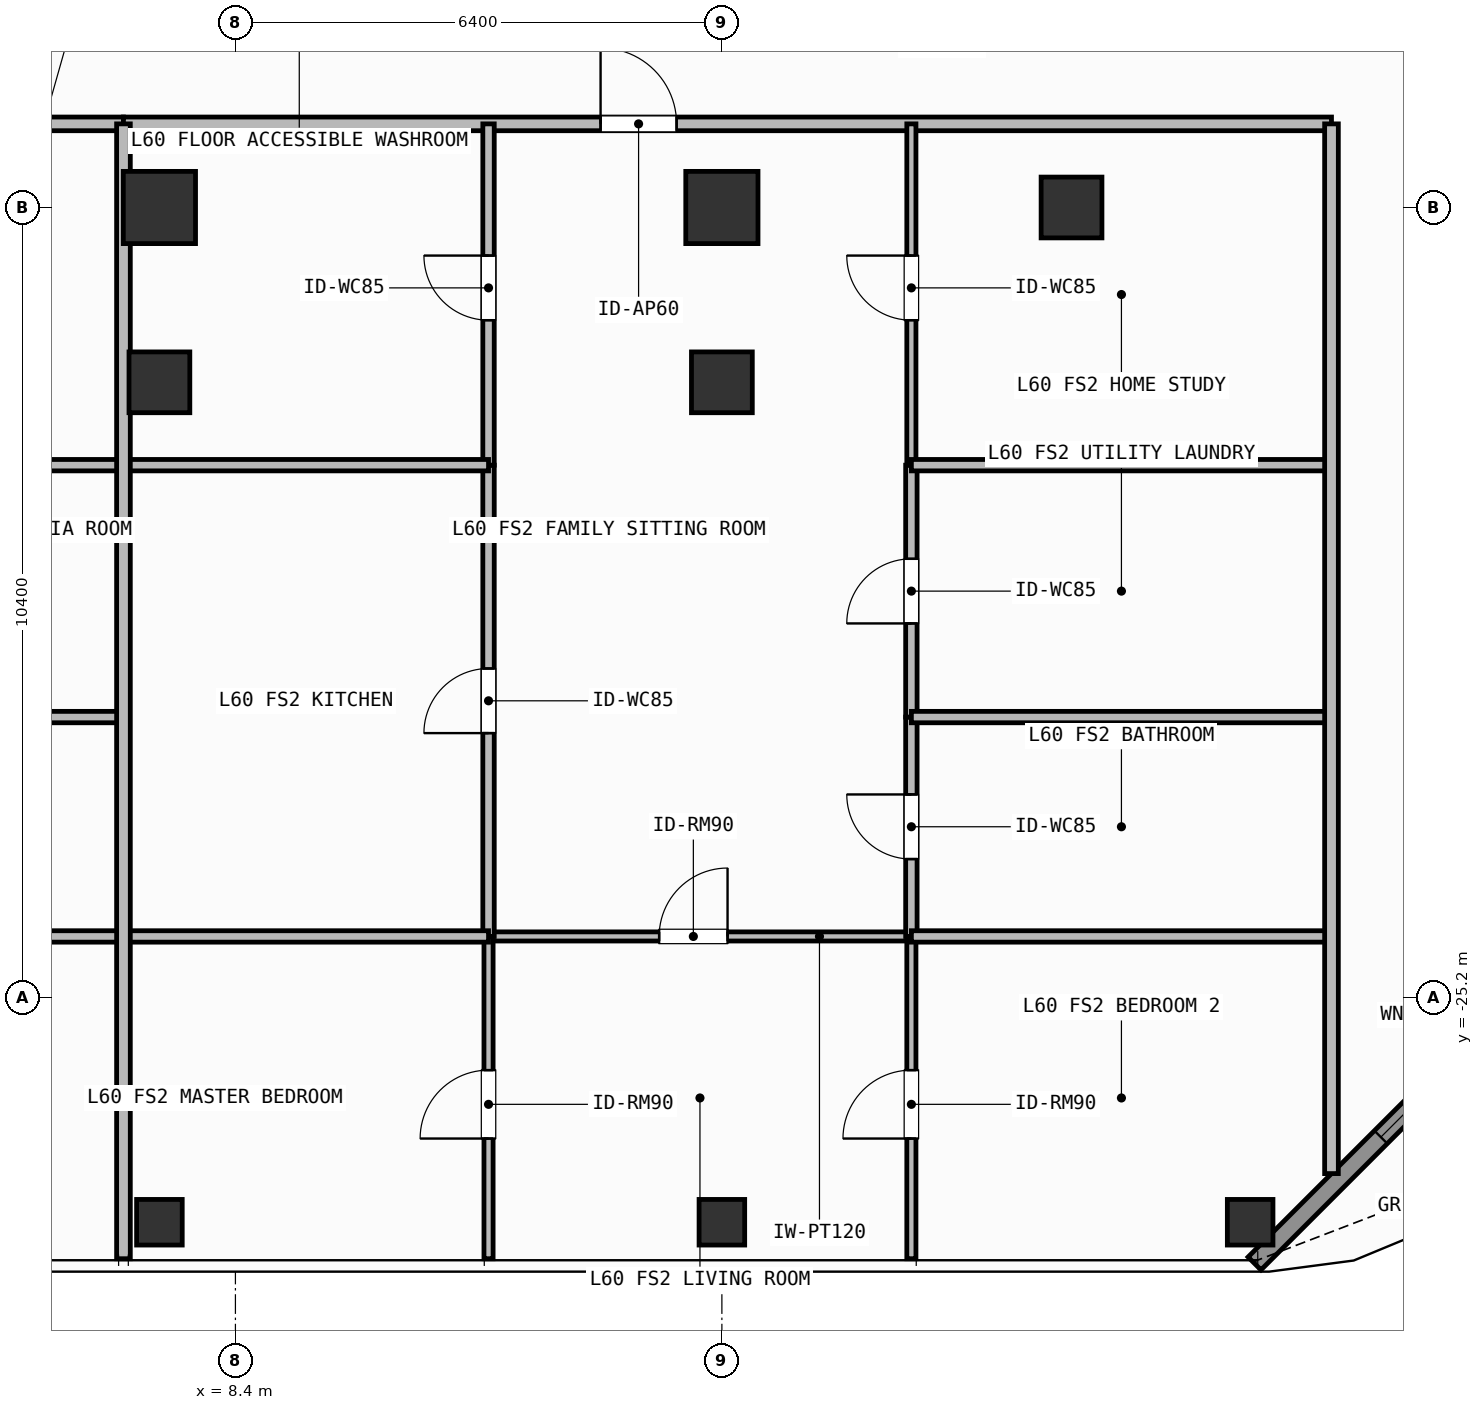
"""IFC4 building model, lengths in metres.
Left out: names, types, materials, properties, quantities, classifications, styles, units other than length and angle.
Written with IfcOpenShell. Run it as: python <this file> out.ifc"""

import sys

from ifc_helpers import new_model, si_unit, direction, frame, frame_2d, origin, origin_2d, place, context, subcontext, project, spatial, rectangle, hollow_rectangle, extrude, element, fill, save


model = new_model("IFC4")
c1 = context("Model", 3, precision=1e-05, world=origin(), true_north=direction((0.0, 1.0)))
c2 = subcontext(c1, "Body", "Model", "MODEL_VIEW")
j1 = project(units=[si_unit("LENGTHUNIT", "METRE"), si_unit("PLANEANGLEUNIT", "RADIAN")], contexts=[c1])
p1 = place(None, origin())
s1 = spatial("IfcSite", under=j1, at=p1, CompositionType="ELEMENT")
p2 = place(p1, origin())
s2 = spatial("IfcBuilding", under=s1, at=p2, CompositionType="ELEMENT")
p3 = place(p2, frame((0.0, 0.0, 246.9)))
s3 = spatial("IfcBuildingStorey", under=s2, at=p3, CompositionType="ELEMENT", Elevation=246.9)
for number, where, z_axis, x_axis in (
    (1, (7.4, -14.8, 0.0), (0.0, 0.0, 1.0), (1.0, 0.0, 0.0)),
    (2, (14.8, -14.8, 0.0), (0.0, 0.0, 1.0), (1.0, 0.0, 0.0)),
):
    element("IfcColumn", number, at=place(p3, frame(where, z_axis=z_axis, x_axis=x_axis)), inside=s3, PredefinedType="COLUMN", context=c2, shape_type="SweptSolid", body=[
        extrude(rectangle(XDim=0.95, YDim=0.95, at=origin_2d()), origin(), (0.0, 0.0, 1.0), 3.9),
    ])
for number, where, z_axis, x_axis in (
    (3, (19.4, -14.8, 0.0), (0.0, 0.0, 1.0), (1.0, 0.0, 0.0)),
    (4, (7.4, -17.1, 0.0), (0.0, 0.0, 1.0), (1.0, 0.0, 0.0)),
    (5, (14.8, -17.1, 0.0), (0.0, 0.0, 1.0), (1.0, 0.0, 0.0)),
):
    element("IfcColumn", number, at=place(p3, frame(where, z_axis=z_axis, x_axis=x_axis)), inside=s3, PredefinedType="COLUMN", context=c2, shape_type="SweptSolid", body=[
        extrude(hollow_rectangle(XDim=0.8, YDim=0.8, WallThickness=0.036, at=origin_2d()), origin(), (0.0, 0.0, 1.0), 3.9),
    ])
for number, where, z_axis, x_axis in (
    (6, (21.75, -28.15, 0.0), (0.0, 0.0, 1.0), (1.0, 0.0, 0.0)),
    (7, (7.4, -28.15, 0.0), (0.0, 0.0, 1.0), (1.0, 0.0, 0.0)),
    (8, (14.8, -28.15, 0.0), (0.0, 0.0, 1.0), (1.0, 0.0, 0.0)),
):
    element("IfcColumn", number, at=place(p3, frame(where, z_axis=z_axis, x_axis=x_axis)), inside=s3, PredefinedType="COLUMN", context=c2, shape_type="SweptSolid", body=[
        extrude(hollow_rectangle(XDim=0.6, YDim=0.6, WallThickness=0.028, at=origin_2d()), origin(), (0.0, 0.0, 1.0), 3.9),
    ])
p4 = place(p3, frame((26.192, -24.308, 0.0), z_axis=(0.0, 0.0, 1.0), x_axis=(-0.707106781187, -0.707106781187, 0.0)))
e9 = element("IfcWall", 9, at=p4, inside=s3, PredefinedType="SOLIDWALL", context=c2, shape_type="SweptSolid", body=[
    extrude(rectangle(XDim=6.201, YDim=0.24, at=frame_2d((3.101, 0.0))), origin(), (0.0, 0.0, 1.0), 3.68),
])
p5 = place(p4, frame((2.351, 0.0, 0.8)))
e10 = element("IfcOpeningElement", 10, at=p5, cuts=e9, PredefinedType="OPENING", context=c2, shape_type="SweptSolid", body=[
    extrude(rectangle(XDim=1.5, YDim=1.85, at=frame_2d((0.75, 0.925))), frame((0.0, 0.13, 0.0), z_axis=(0.0, -1.0, 0.0), x_axis=(1.0, 0.0, 0.0)), (0.0, 0.0, 1.0), 0.26),
])
p6 = place(p3, frame((-15.02, -13.7, 0.0), z_axis=(0.0, 0.0, 1.0), x_axis=(1.0, 0.0, 0.0)))
e11 = element("IfcWall", 11, at=p6, inside=s3, PredefinedType="PARTITIONING", context=c2, shape_type="SweptSolid", body=[
    extrude(rectangle(XDim=21.947, YDim=0.18, at=frame_2d((10.974, 0.0))), origin(), (0.0, 0.0, 1.0), 3.68),
])
p7 = place(p6, frame((10.205, 0.0, 0.0)))
e12 = element("IfcOpeningElement", 12, at=p7, cuts=e11, PredefinedType="OPENING", context=c2, shape_type="SweptSolid", body=[
    extrude(rectangle(XDim=1.0, YDim=2.2, at=frame_2d((0.5, 1.1))), frame((0.0, 0.1, 0.0), z_axis=(0.0, -1.0, 0.0), x_axis=(1.0, 0.0, 0.0)), (0.0, 0.0, 1.0), 0.2),
])
p8 = place(p3, frame((6.927, -13.7, 0.0), z_axis=(0.0, 0.0, 1.0), x_axis=(1.0, 0.0, 0.0)))
e13 = element("IfcWall", 13, at=p8, inside=s3, PredefinedType="PARTITIONING", context=c2, shape_type="SweptSolid", body=[
    extrude(rectangle(XDim=15.893, YDim=0.18, at=frame_2d((7.947, 0.0))), origin(), (0.0, 0.0, 1.0), 3.68),
])
p9 = place(p8, frame((6.277, 0.0, 0.0)))
e14 = element("IfcOpeningElement", 14, at=p9, cuts=e13, PredefinedType="OPENING", context=c2, shape_type="SweptSolid", body=[
    extrude(rectangle(XDim=1.0, YDim=2.2, at=frame_2d((0.5, 1.1))), frame((0.0, 0.1, 0.0), z_axis=(0.0, -1.0, 0.0), x_axis=(1.0, 0.0, 0.0)), (0.0, 0.0, 1.0), 0.2),
])
p10 = place(p3, frame((11.73, -24.39, 0.0), z_axis=(0.0, 0.0, 1.0), x_axis=(1.0, 0.0, 0.0)))
e15 = element("IfcWall", 15, at=p10, inside=s3, PredefinedType="PARTITIONING", context=c2, shape_type="SweptSolid", body=[
    extrude(rectangle(XDim=5.563, YDim=0.12, at=frame_2d((2.781, 0.0))), origin(), (0.0, 0.0, 1.0), 3.68),
])
p11 = place(p10, frame((2.245, 0.0, 0.0)))
e16 = element("IfcOpeningElement", 16, at=p11, cuts=e15, PredefinedType="OPENING", context=c2, shape_type="SweptSolid", body=[
    extrude(rectangle(XDim=0.9, YDim=2.1, at=frame_2d((0.45, 1.05))), frame((0.0, 0.07, 0.0), z_axis=(0.0, -1.0, 0.0), x_axis=(1.0, 0.0, 0.0)), (0.0, 0.0, 1.0), 0.14),
])
p12 = place(p3, frame((11.73, -24.39, 0.0), z_axis=(0.0, 0.0, 1.0), x_axis=(0.0, 1.0, 0.0)))
e17 = element("IfcWall", 17, at=p12, inside=s3, PredefinedType="PARTITIONING", context=c2, shape_type="SweptSolid", body=[
    extrude(rectangle(XDim=6.2, YDim=0.15, at=frame_2d((3.1, 0.0))), origin(), (0.0, 0.0, 1.0), 3.68),
])
p13 = place(p12, frame((2.675, 0.0, 0.0)))
e18 = element("IfcOpeningElement", 18, at=p13, cuts=e17, PredefinedType="OPENING", context=c2, shape_type="SweptSolid", body=[
    extrude(rectangle(XDim=0.85, YDim=2.1, at=frame_2d((0.425, 1.05))), frame((0.0, 0.085, 0.0), z_axis=(0.0, -1.0, 0.0), x_axis=(1.0, 0.0, 0.0)), (0.0, 0.0, 1.0), 0.17),
])
p14 = place(p3, frame((11.73, -18.19, 0.0), z_axis=(0.0, 0.0, 1.0), x_axis=(0.0, 1.0, 0.0)))
e19 = element("IfcWall", 19, at=p14, inside=s3, PredefinedType="PARTITIONING", context=c2, shape_type="SweptSolid", body=[
    extrude(rectangle(XDim=4.49, YDim=0.15, at=frame_2d((2.245, 0.0))), origin(), (0.0, 0.0, 1.0), 3.68),
])
p15 = place(p14, frame((1.907, 0.0, 0.0)))
e20 = element("IfcOpeningElement", 20, at=p15, cuts=e19, PredefinedType="OPENING", context=c2, shape_type="SweptSolid", body=[
    extrude(rectangle(XDim=0.85, YDim=2.1, at=frame_2d((0.425, 1.05))), frame((0.0, 0.085, 0.0), z_axis=(0.0, -1.0, 0.0), x_axis=(1.0, 0.0, 0.0)), (0.0, 0.0, 1.0), 0.17),
])
p16 = place(p3, frame((11.73, -28.63, 0.0), z_axis=(0.0, 0.0, 1.0), x_axis=(0.0, 1.0, 0.0)))
e21 = element("IfcWall", 21, at=p16, inside=s3, PredefinedType="PARTITIONING", context=c2, shape_type="SweptSolid", body=[
    extrude(rectangle(XDim=4.24, YDim=0.12, at=frame_2d((2.12, 0.0))), origin(), (0.0, 0.0, 1.0), 3.68),
])
p17 = place(p16, frame((1.581, 0.0, 0.0)))
e22 = element("IfcOpeningElement", 22, at=p17, cuts=e21, PredefinedType="OPENING", context=c2, shape_type="SweptSolid", body=[
    extrude(rectangle(XDim=0.9, YDim=2.1, at=frame_2d((0.45, 1.05))), frame((0.0, 0.07, 0.0), z_axis=(0.0, -1.0, 0.0), x_axis=(1.0, 0.0, 0.0)), (0.0, 0.0, 1.0), 0.14),
])
p18 = place(p3, frame((17.293, -24.39, 0.0), z_axis=(0.0, 0.0, 1.0), x_axis=(0.0, 1.0, 0.0)))
e23 = element("IfcWall", 23, at=p18, inside=s3, PredefinedType="PARTITIONING", context=c2, shape_type="SweptSolid", body=[
    extrude(rectangle(XDim=2.886, YDim=0.15, at=frame_2d((1.443, 0.0))), origin(), (0.0, 0.0, 1.0), 3.68),
])
p19 = place(p18, frame((1.018, 0.0, 0.0)))
e24 = element("IfcOpeningElement", 24, at=p19, cuts=e23, PredefinedType="OPENING", context=c2, shape_type="SweptSolid", body=[
    extrude(rectangle(XDim=0.85, YDim=2.1, at=frame_2d((0.425, 1.05))), frame((0.0, 0.085, 0.0), z_axis=(0.0, -1.0, 0.0), x_axis=(1.0, 0.0, 0.0)), (0.0, 0.0, 1.0), 0.17),
])
p20 = place(p3, frame((17.293, -21.504, 0.0), z_axis=(0.0, 0.0, 1.0), x_axis=(0.0, 1.0, 0.0)))
e25 = element("IfcWall", 25, at=p20, inside=s3, PredefinedType="PARTITIONING", context=c2, shape_type="SweptSolid", body=[
    extrude(rectangle(XDim=3.314, YDim=0.15, at=frame_2d((1.657, 0.0))), origin(), (0.0, 0.0, 1.0), 3.68),
])
p21 = place(p20, frame((1.232, 0.0, 0.0)))
e26 = element("IfcOpeningElement", 26, at=p21, cuts=e25, PredefinedType="OPENING", context=c2, shape_type="SweptSolid", body=[
    extrude(rectangle(XDim=0.85, YDim=2.1, at=frame_2d((0.425, 1.05))), frame((0.0, 0.085, 0.0), z_axis=(0.0, -1.0, 0.0), x_axis=(1.0, 0.0, 0.0)), (0.0, 0.0, 1.0), 0.17),
])
p22 = place(p3, frame((17.293, -18.19, 0.0), z_axis=(0.0, 0.0, 1.0), x_axis=(0.0, 1.0, 0.0)))
e27 = element("IfcWall", 27, at=p22, inside=s3, PredefinedType="PARTITIONING", context=c2, shape_type="SweptSolid", body=[
    extrude(rectangle(XDim=4.49, YDim=0.12, at=frame_2d((2.245, 0.0))), origin(), (0.0, 0.0, 1.0), 3.68),
])
p23 = place(p22, frame((1.907, 0.0, 0.0)))
e28 = element("IfcOpeningElement", 28, at=p23, cuts=e27, PredefinedType="OPENING", context=c2, shape_type="SweptSolid", body=[
    extrude(rectangle(XDim=0.85, YDim=2.1, at=frame_2d((0.425, 1.05))), frame((0.0, 0.07, 0.0), z_axis=(0.0, -1.0, 0.0), x_axis=(1.0, 0.0, 0.0)), (0.0, 0.0, 1.0), 0.14),
])
p24 = place(p3, frame((17.293, -28.63, 0.0), z_axis=(0.0, 0.0, 1.0), x_axis=(0.0, 1.0, 0.0)))
e29 = element("IfcWall", 29, at=p24, inside=s3, PredefinedType="PARTITIONING", context=c2, shape_type="SweptSolid", body=[
    extrude(rectangle(XDim=4.24, YDim=0.12, at=frame_2d((2.12, 0.0))), origin(), (0.0, 0.0, 1.0), 3.68),
])
p25 = place(p24, frame((1.581, 0.0, 0.0)))
e30 = element("IfcOpeningElement", 30, at=p25, cuts=e29, PredefinedType="OPENING", context=c2, shape_type="SweptSolid", body=[
    extrude(rectangle(XDim=0.9, YDim=2.1, at=frame_2d((0.45, 1.05))), frame((0.0, 0.07, 0.0), z_axis=(0.0, -1.0, 0.0), x_axis=(1.0, 0.0, 0.0)), (0.0, 0.0, 1.0), 0.14),
])
for number, where, z_axis, x_axis in (
    (31, (1.943, -21.504, 0.0), (0.0, 0.0, 1.0), (1.0, 0.0, 0.0)),
    (32, (1.943, -18.19, 0.0), (0.0, 0.0, 1.0), (1.0, 0.0, 0.0)),
    (33, (1.943, -24.39, 0.0), (0.0, 0.0, 1.0), (1.0, 0.0, 0.0)),
):
    element("IfcWall", number, at=place(p3, frame(where, z_axis=z_axis, x_axis=x_axis)), inside=s3, PredefinedType="PARTITIONING", context=c2, shape_type="SweptSolid", body=[
        extrude(rectangle(XDim=4.984, YDim=0.15, at=frame_2d((2.492, 0.0))), origin(), (0.0, 0.0, 1.0), 3.68),
    ])
for number, where, z_axis, x_axis in (
    (34, (6.927, -18.19, 0.0), (0.0, 0.0, 1.0), (1.0, 0.0, 0.0)),
    (35, (6.927, -24.39, 0.0), (0.0, 0.0, 1.0), (1.0, 0.0, 0.0)),
):
    element("IfcWall", number, at=place(p3, frame(where, z_axis=z_axis, x_axis=x_axis)), inside=s3, PredefinedType="PARTITIONING", context=c2, shape_type="SweptSolid", body=[
        extrude(rectangle(XDim=4.803, YDim=0.15, at=frame_2d((2.401, 0.0))), origin(), (0.0, 0.0, 1.0), 3.68),
    ])
p26 = place(p3, frame((17.293, -21.504, 0.0), z_axis=(0.0, 0.0, 1.0), x_axis=(1.0, 0.0, 0.0)))
e36 = element("IfcWall", 36, at=p26, inside=s3, PredefinedType="PARTITIONING", context=c2, shape_type="SweptSolid", body=[
    extrude(rectangle(XDim=5.527, YDim=0.15, at=frame_2d((2.764, 0.0))), origin(), (0.0, 0.0, 1.0), 3.42),
])
for number, where, z_axis, x_axis in (
    (37, (17.293, -18.19, 0.0), (0.0, 0.0, 1.0), (1.0, 0.0, 0.0)),
    (38, (17.293, -24.39, 0.0), (0.0, 0.0, 1.0), (1.0, 0.0, 0.0)),
):
    element("IfcWall", number, at=place(p3, frame(where, z_axis=z_axis, x_axis=x_axis)), inside=s3, PredefinedType="PARTITIONING", context=c2, shape_type="SweptSolid", body=[
        extrude(rectangle(XDim=5.527, YDim=0.15, at=frame_2d((2.764, 0.0))), origin(), (0.0, 0.0, 1.0), 3.68),
    ])
p27 = place(p3, frame((6.927, -28.63, 0.0), z_axis=(0.0, 0.0, 1.0), x_axis=(0.0, 1.0, 0.0)))
e39 = element("IfcWall", 39, at=p27, inside=s3, PredefinedType="PARTITIONING", context=c2, shape_type="SweptSolid", body=[
    extrude(rectangle(XDim=14.93, YDim=0.18, at=frame_2d((7.465, 0.0))), origin(), (0.0, 0.0, 1.0), 3.68),
])
p28 = place(p3, frame((22.82, -27.51, 0.0), z_axis=(0.0, 0.0, 1.0), x_axis=(0.0, 1.0, 0.0)))
e40 = element("IfcWall", 40, at=p28, inside=s3, PredefinedType="PARTITIONING", context=c2, shape_type="SweptSolid", body=[
    extrude(rectangle(XDim=13.81, YDim=0.18, at=frame_2d((6.905, 0.0))), origin(), (0.0, 0.0, 1.0), 3.68),
])
p29 = place(p5, origin())
e41 = element("IfcWindow", 41, at=p29, inside=s3, PartitioningType="SINGLE_PANEL", PredefinedType="WINDOW", context=c2, shape_type="SweptSolid", body=[
    extrude(rectangle(XDim=1.5, YDim=1.85, at=frame_2d((0.75, 0.925))), frame((0.0, 0.03, 0.0), z_axis=(0.0, -1.0, 0.0), x_axis=(1.0, 0.0, 0.0)), (0.0, 0.0, 1.0), 0.06),
])
fill(e10, e41)
p30 = place(p9, origin())
e42 = element("IfcDoor", 42, at=p30, inside=s3, OperationType="SINGLE_SWING_LEFT", PredefinedType="DOOR", context=c2, shape_type="SweptSolid", body=[
    extrude(rectangle(XDim=1.0, YDim=2.2, at=frame_2d((0.5, 1.1))), frame((0.0, 0.025, 0.0), z_axis=(0.0, -1.0, 0.0), x_axis=(1.0, 0.0, 0.0)), (0.0, 0.0, 1.0), 0.05),
])
fill(e14, e42)
p31 = place(p11, origin())
e43 = element("IfcDoor", 43, at=p31, inside=s3, OperationType="SINGLE_SWING_RIGHT", PredefinedType="DOOR", context=c2, shape_type="SweptSolid", body=[
    extrude(rectangle(XDim=0.9, YDim=2.1, at=frame_2d((0.45, 1.05))), frame((0.0, 0.025, 0.0), z_axis=(0.0, -1.0, 0.0), x_axis=(1.0, 0.0, 0.0)), (0.0, 0.0, 1.0), 0.05),
])
fill(e16, e43)
p32 = place(p13, origin())
e44 = element("IfcDoor", 44, at=p32, inside=s3, OperationType="SINGLE_SWING_LEFT", PredefinedType="DOOR", context=c2, shape_type="SweptSolid", body=[
    extrude(rectangle(XDim=0.85, YDim=2.1, at=frame_2d((0.425, 1.05))), frame((0.0, 0.025, 0.0), z_axis=(0.0, -1.0, 0.0), x_axis=(1.0, 0.0, 0.0)), (0.0, 0.0, 1.0), 0.05),
])
fill(e18, e44)
p33 = place(p15, origin())
e45 = element("IfcDoor", 45, at=p33, inside=s3, OperationType="SINGLE_SWING_RIGHT", PredefinedType="DOOR", context=c2, shape_type="SweptSolid", body=[
    extrude(rectangle(XDim=0.85, YDim=2.1, at=frame_2d((0.425, 1.05))), frame((0.0, 0.025, 0.0), z_axis=(0.0, -1.0, 0.0), x_axis=(1.0, 0.0, 0.0)), (0.0, 0.0, 1.0), 0.05),
])
fill(e20, e45)
p34 = place(p17, origin())
e46 = element("IfcDoor", 46, at=p34, inside=s3, OperationType="SINGLE_SWING_LEFT", PredefinedType="DOOR", context=c2, shape_type="SweptSolid", body=[
    extrude(rectangle(XDim=0.9, YDim=2.1, at=frame_2d((0.45, 1.05))), frame((0.0, 0.025, 0.0), z_axis=(0.0, -1.0, 0.0), x_axis=(1.0, 0.0, 0.0)), (0.0, 0.0, 1.0), 0.05),
])
fill(e22, e46)
p35 = place(p19, origin())
e47 = element("IfcDoor", 47, at=p35, inside=s3, OperationType="SINGLE_SWING_RIGHT", PredefinedType="DOOR", context=c2, shape_type="SweptSolid", body=[
    extrude(rectangle(XDim=0.85, YDim=2.1, at=frame_2d((0.425, 1.05))), frame((0.0, 0.025, 0.0), z_axis=(0.0, -1.0, 0.0), x_axis=(1.0, 0.0, 0.0)), (0.0, 0.0, 1.0), 0.05),
])
fill(e24, e47)
p36 = place(p21, origin())
e48 = element("IfcDoor", 48, at=p36, inside=s3, OperationType="SINGLE_SWING_LEFT", PredefinedType="DOOR", context=c2, shape_type="SweptSolid", body=[
    extrude(rectangle(XDim=0.85, YDim=2.1, at=frame_2d((0.425, 1.05))), frame((0.0, 0.025, 0.0), z_axis=(0.0, -1.0, 0.0), x_axis=(1.0, 0.0, 0.0)), (0.0, 0.0, 1.0), 0.05),
])
fill(e26, e48)
p37 = place(p23, origin())
e49 = element("IfcDoor", 49, at=p37, inside=s3, OperationType="SINGLE_SWING_RIGHT", PredefinedType="DOOR", context=c2, shape_type="SweptSolid", body=[
    extrude(rectangle(XDim=0.85, YDim=2.1, at=frame_2d((0.425, 1.05))), frame((0.0, 0.025, 0.0), z_axis=(0.0, -1.0, 0.0), x_axis=(1.0, 0.0, 0.0)), (0.0, 0.0, 1.0), 0.05),
])
fill(e28, e49)
p38 = place(p25, origin())
e50 = element("IfcDoor", 50, at=p38, inside=s3, OperationType="SINGLE_SWING_LEFT", PredefinedType="DOOR", context=c2, shape_type="SweptSolid", body=[
    extrude(rectangle(XDim=0.9, YDim=2.1, at=frame_2d((0.45, 1.05))), frame((0.0, 0.025, 0.0), z_axis=(0.0, -1.0, 0.0), x_axis=(1.0, 0.0, 0.0)), (0.0, 0.0, 1.0), 0.05),
])
fill(e30, e50)
save(model, sys.argv[1])
